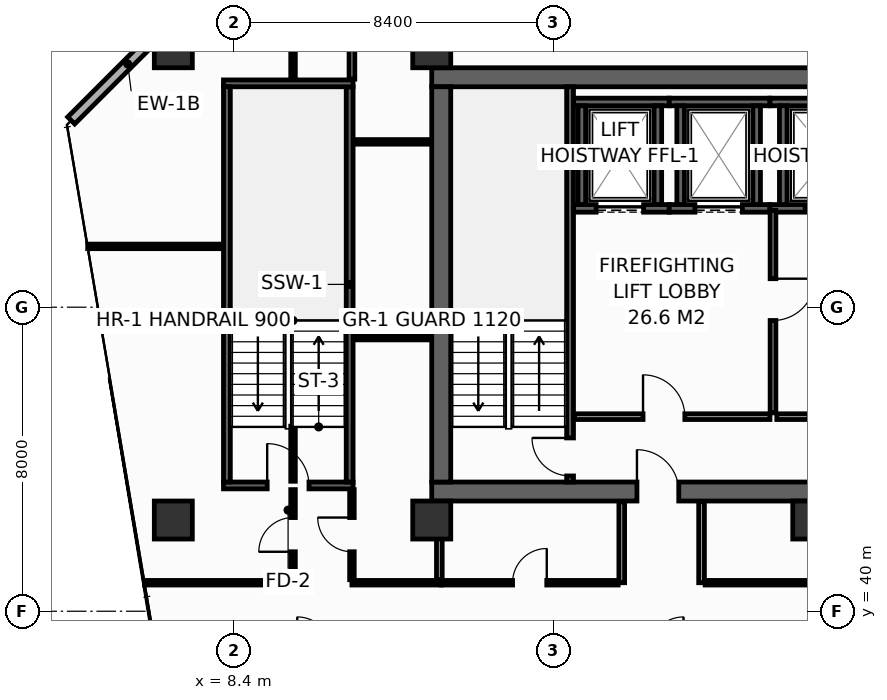
"""IFC4 building model, lengths in metres.
Left out: names, types, materials, properties, quantities, classifications, styles, units other than length and angle.
Written with IfcOpenShell. Run it as: python <this file> out.ifc"""

import sys

from ifc_helpers import new_model, si_unit, direction, frame, frame_2d, origin, origin_2d, place, context, subcontext, project, spatial, rectangle, hollow_rectangle, extrude, element, fill, save


model = new_model("IFC4")
c1 = context("Model", 3, precision=1e-05, world=origin(), true_north=direction((0.0, 1.0)))
c2 = subcontext(c1, "Body", "Model", "MODEL_VIEW")
j1 = project(units=[si_unit("LENGTHUNIT", "METRE"), si_unit("PLANEANGLEUNIT", "RADIAN")], contexts=[c1])
p1 = place(None, origin())
s1 = spatial("IfcSite", under=j1, at=p1, CompositionType="ELEMENT")
p2 = place(p1, origin())
s2 = spatial("IfcBuilding", under=s1, at=p2, CompositionType="ELEMENT")
p3 = place(p2, frame((0.0, 0.0, 167.6)))
s3 = spatial("IfcBuildingStorey", under=s2, at=p3, CompositionType="ELEMENT", Elevation=167.6)
p4 = place(p3, frame((13.6, 43.15, 0.0), z_axis=(0.0, 0.0, 1.0), x_axis=(1.0, 0.0, 0.0)))
e1 = element("IfcWall", 1, at=p4, inside=s3, PredefinedType="SHEAR", context=c2, shape_type="SweptSolid", body=[
    extrude(rectangle(XDim=32.7, YDim=0.5, at=frame_2d((16.35, 0.0))), origin(), (0.0, 0.0, 1.0), 3.55),
])
p5 = place(p4, frame((5.4, 0.0, 0.0)))
e2 = element("IfcOpeningElement", 2, at=p5, cuts=e1, PredefinedType="OPENING", context=c2, shape_type="SweptSolid", body=[
    extrude(rectangle(XDim=1.1, YDim=2.15, at=frame_2d((0.55, 1.075))), frame((0.0, 0.26, 0.0), z_axis=(0.0, -1.0, 0.0), x_axis=(1.0, 0.0, 0.0)), (0.0, 0.0, 1.0), 0.52),
])
p6 = place(p4, frame((25.6, 0.0, 0.0)))
e3 = element("IfcOpeningElement", 3, at=p6, cuts=e1, PredefinedType="OPENING", context=c2, shape_type="SweptSolid", body=[
    extrude(rectangle(XDim=1.1, YDim=2.15, at=frame_2d((0.55, 1.075))), frame((0.0, 0.26, 0.0), z_axis=(0.0, -1.0, 0.0), x_axis=(1.0, 0.0, 0.0)), (0.0, 0.0, 1.0), 0.52),
])
p7 = place(p3, frame((13.6, 54.05, 0.0), z_axis=(0.0, 0.0, 1.0), x_axis=(1.0, 0.0, 0.0)))
e4 = element("IfcWall", 4, at=p7, inside=s3, PredefinedType="SHEAR", context=c2, shape_type="SweptSolid", body=[
    extrude(rectangle(XDim=32.7, YDim=0.5, at=frame_2d((16.35, 0.0))), origin(), (0.0, 0.0, 1.0), 3.55),
])
p8 = place(p3, frame((13.85, 43.4, 0.0), z_axis=(0.0, 0.0, 1.0), x_axis=(0.0, 1.0, 0.0)))
e5 = element("IfcWall", 5, at=p8, inside=s3, PredefinedType="SHEAR", context=c2, shape_type="SweptSolid", body=[
    extrude(rectangle(XDim=10.4, YDim=0.5, at=frame_2d((5.2, 0.0))), origin(), (0.0, 0.0, 1.0), 3.55),
])
for number, where, z_axis, x_axis in (
    (6, (6.8, 54.8, 0.0), (0.0, 0.0, 1.0), (1.0, 0.0, 0.0)),
    (7, (13.6, 54.8, 0.0), (0.0, 0.0, 1.0), (1.0, 0.0, 0.0)),
    (8, (6.8, 42.4, 0.0), (0.0, 0.0, 1.0), (1.0, 0.0, 0.0)),
    (9, (13.6, 42.4, 0.0), (0.0, 0.0, 1.0), (1.0, 0.0, 0.0)),
    (10, (23.6, 42.4, 0.0), (0.0, 0.0, 1.0), (1.0, 0.0, 0.0)),
):
    element("IfcColumn", number, at=place(p3, frame(where, z_axis=z_axis, x_axis=x_axis)), inside=s3, PredefinedType="COLUMN", context=c2, shape_type="SweptSolid", body=[
        extrude(hollow_rectangle(XDim=1.0, YDim=1.0, WallThickness=0.045, at=origin_2d()), origin(), (0.0, 0.0, 1.0), 3.8),
    ])
p9 = place(p3, frame((17.33, 50.6, 0.0), z_axis=(0.0, 0.0, 1.0), x_axis=(1.0, 0.0, 0.0)))
e11 = element("IfcWall", 11, at=p9, inside=s3, PredefinedType="SHEAR", context=c2, shape_type="SweptSolid", body=[
    extrude(rectangle(XDim=2.52, YDim=0.2, at=frame_2d((1.26, 0.0))), origin(), (0.0, 0.0, 1.0), 3.55),
])
p10 = place(p9, frame((0.595, 0.0, 0.0)))
e12 = element("IfcOpeningElement", 12, at=p10, cuts=e11, PredefinedType="OPENING", context=c2, shape_type="SweptSolid", body=[
    extrude(rectangle(XDim=1.25, YDim=2.3, at=frame_2d((0.625, 1.15))), frame((0.0, 0.11, 0.0), z_axis=(0.0, -1.0, 0.0), x_axis=(1.0, 0.0, 0.0)), (0.0, 0.0, 1.0), 0.22),
])
p11 = place(p3, frame((17.33, 53.4, 0.0), z_axis=(0.0, 0.0, 1.0), x_axis=(1.0, 0.0, 0.0)))
e13 = element("IfcWall", 13, at=p11, inside=s3, PredefinedType="SHEAR", context=c2, shape_type="SweptSolid", body=[
    extrude(rectangle(XDim=2.52, YDim=0.2, at=frame_2d((1.26, 0.0))), origin(), (0.0, 0.0, 1.0), 3.55),
])
for number, where, z_axis, x_axis in (
    (14, (17.55, 50.7, 0.0), (0.0, 0.0, 1.0), (0.0, 1.0, 0.0)),
    (15, (19.55, 50.7, 0.0), (0.0, 0.0, 1.0), (0.0, 1.0, 0.0)),
):
    element("IfcWall", number, at=place(p3, frame(where, z_axis=z_axis, x_axis=x_axis)), inside=s3, PredefinedType="SHEAR", context=c2, shape_type="SweptSolid", body=[
        extrude(rectangle(XDim=2.6, YDim=0.2, at=frame_2d((1.3, 0.0))), origin(), (0.0, 0.0, 1.0), 3.55),
    ])
p12 = place(p3, frame((19.85, 50.6, 0.0), z_axis=(0.0, 0.0, 1.0), x_axis=(1.0, 0.0, 0.0)))
e16 = element("IfcWall", 16, at=p12, inside=s3, PredefinedType="SHEAR", context=c2, shape_type="SweptSolid", body=[
    extrude(rectangle(XDim=2.65, YDim=0.2, at=frame_2d((1.325, 0.0))), origin(), (0.0, 0.0, 1.0), 3.55),
])
p13 = place(p12, frame((0.675, 0.0, 0.0)))
e17 = element("IfcOpeningElement", 17, at=p13, cuts=e16, PredefinedType="OPENING", context=c2, shape_type="SweptSolid", body=[
    extrude(rectangle(XDim=1.25, YDim=2.3, at=frame_2d((0.625, 1.15))), frame((0.0, 0.11, 0.0), z_axis=(0.0, -1.0, 0.0), x_axis=(1.0, 0.0, 0.0)), (0.0, 0.0, 1.0), 0.22),
])
p14 = place(p3, frame((19.85, 53.4, 0.0), z_axis=(0.0, 0.0, 1.0), x_axis=(1.0, 0.0, 0.0)))
e18 = element("IfcWall", 18, at=p14, inside=s3, PredefinedType="SHEAR", context=c2, shape_type="SweptSolid", body=[
    extrude(rectangle(XDim=2.65, YDim=0.2, at=frame_2d((1.325, 0.0))), origin(), (0.0, 0.0, 1.0), 3.55),
])
for number, where, z_axis, x_axis in (
    (19, (20.15, 50.7, 0.0), (0.0, 0.0, 1.0), (0.0, 1.0, 0.0)),
    (20, (22.15, 50.7, 0.0), (0.0, 0.0, 1.0), (0.0, 1.0, 0.0)),
):
    element("IfcWall", number, at=place(p3, frame(where, z_axis=z_axis, x_axis=x_axis)), inside=s3, PredefinedType="SHEAR", context=c2, shape_type="SweptSolid", body=[
        extrude(rectangle(XDim=2.6, YDim=0.2, at=frame_2d((1.3, 0.0))), origin(), (0.0, 0.0, 1.0), 3.55),
    ])
p15 = place(p3, frame((22.5, 50.6, 0.0), z_axis=(0.0, 0.0, 1.0), x_axis=(1.0, 0.0, 0.0)))
e21 = element("IfcWall", 21, at=p15, inside=s3, PredefinedType="SHEAR", context=c2, shape_type="SweptSolid", body=[
    extrude(rectangle(XDim=2.85, YDim=0.2, at=frame_2d((1.425, 0.0))), origin(), (0.0, 0.0, 1.0), 3.55),
])
p16 = place(p15, frame((0.925, 0.0, 0.0)))
e22 = element("IfcOpeningElement", 22, at=p16, cuts=e21, PredefinedType="OPENING", context=c2, shape_type="SweptSolid", body=[
    extrude(rectangle(XDim=1.25, YDim=2.3, at=frame_2d((0.625, 1.15))), frame((0.0, 0.11, 0.0), z_axis=(0.0, -1.0, 0.0), x_axis=(1.0, 0.0, 0.0)), (0.0, 0.0, 1.0), 0.22),
])
p17 = place(p3, frame((22.5, 53.4, 0.0), z_axis=(0.0, 0.0, 1.0), x_axis=(1.0, 0.0, 0.0)))
e23 = element("IfcWall", 23, at=p17, inside=s3, PredefinedType="SHEAR", context=c2, shape_type="SweptSolid", body=[
    extrude(rectangle(XDim=2.85, YDim=0.2, at=frame_2d((1.425, 0.0))), origin(), (0.0, 0.0, 1.0), 3.55),
])
p18 = place(p3, frame((22.85, 50.7, 0.0), z_axis=(0.0, 0.0, 1.0), x_axis=(0.0, 1.0, 0.0)))
e24 = element("IfcWall", 24, at=p18, inside=s3, PredefinedType="SHEAR", context=c2, shape_type="SweptSolid", body=[
    extrude(rectangle(XDim=2.6, YDim=0.2, at=frame_2d((1.3, 0.0))), origin(), (0.0, 0.0, 1.0), 3.55),
])
p19 = place(p3, frame((17.24, 43.4, 0.0), z_axis=(0.0, 0.0, 1.0), x_axis=(0.0, 1.0, 0.0)))
e25 = element("IfcWall", 25, at=p19, inside=s3, PredefinedType="SHEAR", context=c2, shape_type="SweptSolid", body=[
    extrude(rectangle(XDim=10.4, YDim=0.18, at=frame_2d((5.2, 0.0))), origin(), (0.0, 0.0, 1.0), 3.55),
])
p20 = place(p19, frame((0.16, 0.0, 0.0)))
e26 = element("IfcOpeningElement", 26, at=p20, cuts=e25, PredefinedType="OPENING", context=c2, shape_type="SweptSolid", body=[
    extrude(rectangle(XDim=1.0, YDim=2.15, at=frame_2d((0.5, 1.075))), frame((0.0, 0.1, 0.0), z_axis=(0.0, -1.0, 0.0), x_axis=(1.0, 0.0, 0.0)), (0.0, 0.0, 1.0), 0.2),
])
p21 = place(p3, frame((8.12, 43.31, 0.0), z_axis=(0.0, 0.0, 1.0), x_axis=(1.0, 0.0, 0.0)))
e27 = element("IfcWall", 27, at=p21, inside=s3, PredefinedType="SHEAR", context=c2, shape_type="SweptSolid", body=[
    extrude(rectangle(XDim=3.41, YDim=0.18, at=frame_2d((1.705, 0.0))), origin(), (0.0, 0.0, 1.0), 3.55),
])
p22 = place(p21, frame((1.15, 0.0, 0.0)))
e28 = element("IfcOpeningElement", 28, at=p22, cuts=e27, PredefinedType="OPENING", context=c2, shape_type="SweptSolid", body=[
    extrude(rectangle(XDim=1.1, YDim=2.15, at=frame_2d((0.55, 1.075))), frame((0.0, 0.1, 0.0), z_axis=(0.0, -1.0, 0.0), x_axis=(1.0, 0.0, 0.0)), (0.0, 0.0, 1.0), 0.2),
])
p23 = place(p3, frame((11.44, 43.4, 0.0), z_axis=(0.0, 0.0, 1.0), x_axis=(0.0, 1.0, 0.0)))
e29 = element("IfcWall", 29, at=p23, inside=s3, PredefinedType="SHEAR", context=c2, shape_type="SweptSolid", body=[
    extrude(rectangle(XDim=10.4, YDim=0.18, at=frame_2d((5.2, 0.0))), origin(), (0.0, 0.0, 1.0), 3.55),
])
p24 = place(p3, frame((11.53, 53.89, 0.0), z_axis=(0.0, 0.0, 1.0), x_axis=(-1.0, 0.0, 0.0)))
e30 = element("IfcWall", 30, at=p24, inside=s3, PredefinedType="SHEAR", context=c2, shape_type="SweptSolid", body=[
    extrude(rectangle(XDim=3.41, YDim=0.18, at=frame_2d((1.705, 0.0))), origin(), (0.0, 0.0, 1.0), 3.55),
])
p25 = place(p3, frame((8.21, 53.8, 0.0), z_axis=(0.0, 0.0, 1.0), x_axis=(0.0, -1.0, 0.0)))
e31 = element("IfcWall", 31, at=p25, inside=s3, PredefinedType="SHEAR", context=c2, shape_type="SweptSolid", body=[
    extrude(rectangle(XDim=10.4, YDim=0.18, at=frame_2d((5.2, 0.0))), origin(), (0.0, 0.0, 1.0), 3.55),
])
p26 = place(p3, frame((17.36, 45.12, 0.0), z_axis=(0.0, 0.0, 1.0), x_axis=(1.0, 0.0, 0.0)))
e32 = element("IfcWall", 32, at=p26, inside=s3, PredefinedType="PARTITIONING", context=c2, shape_type="SweptSolid", body=[
    extrude(rectangle(XDim=5.14, YDim=0.15, at=frame_2d((2.57, 0.0))), origin(), (0.0, 0.0, 1.0), 3.55),
])
p27 = place(p26, frame((1.8, 0.0, 0.0)))
e33 = element("IfcOpeningElement", 33, at=p27, cuts=e32, PredefinedType="OPENING", context=c2, shape_type="SweptSolid", body=[
    extrude(rectangle(XDim=1.1, YDim=2.15, at=frame_2d((0.55, 1.075))), frame((0.0, 0.085, 0.0), z_axis=(0.0, -1.0, 0.0), x_axis=(1.0, 0.0, 0.0)), (0.0, 0.0, 1.0), 0.17),
])
p28 = place(p3, frame((22.58, 50.55, 0.0), z_axis=(0.0, 0.0, 1.0), x_axis=(0.0, -1.0, 0.0)))
e34 = element("IfcWall", 34, at=p28, inside=s3, PredefinedType="PARTITIONING", context=c2, shape_type="SweptSolid", body=[
    extrude(rectangle(XDim=5.33, YDim=0.15, at=frame_2d((2.665, 0.0))), origin(), (0.0, 0.0, 1.0), 3.55),
])
p29 = place(p28, frame((1.8, 0.0, 0.0)))
e35 = element("IfcOpeningElement", 35, at=p29, cuts=e34, PredefinedType="OPENING", context=c2, shape_type="SweptSolid", body=[
    extrude(rectangle(XDim=1.1, YDim=2.15, at=frame_2d((0.55, 1.075))), frame((0.0, 0.085, 0.0), z_axis=(0.0, -1.0, 0.0), x_axis=(1.0, 0.0, 0.0)), (0.0, 0.0, 1.0), 0.17),
])
p30 = place(p3, frame((22.68, 45.12, 0.0), z_axis=(0.0, 0.0, 1.0), x_axis=(1.0, 0.0, 0.0)))
e36 = element("IfcWall", 36, at=p30, inside=s3, PredefinedType="PARTITIONING", context=c2, shape_type="SweptSolid", body=[
    extrude(rectangle(XDim=2.92, YDim=0.15, at=frame_2d((1.46, 0.0))), origin(), (0.0, 0.0, 1.0), 3.55),
])
p31 = place(p30, frame((0.85, 0.0, 0.0)))
e37 = element("IfcOpeningElement", 37, at=p31, cuts=e36, PredefinedType="OPENING", context=c2, shape_type="SweptSolid", body=[
    extrude(rectangle(XDim=1.1, YDim=2.15, at=frame_2d((0.55, 1.075))), frame((0.0, 0.085, 0.0), z_axis=(0.0, -1.0, 0.0), x_axis=(1.0, 0.0, 0.0)), (0.0, 0.0, 1.0), 0.17),
])
p32 = place(p3, frame((7.087, 55.887, 0.0), z_axis=(0.0, 0.0, 1.0), x_axis=(-0.707106781187, -0.707106781187, 0.0)))
e38 = element("IfcWall", 38, at=p32, inside=s3, PredefinedType="STANDARD", context=c2, shape_type="SweptSolid", body=[
    extrude(rectangle(XDim=4.206, YDim=0.26, at=frame_2d((2.103, 0.0))), origin(), (0.0, 0.0, 1.0), 3.55),
])
p33 = place(p3, frame((6.045, 40.75, 0.0), z_axis=(0.0, 0.0, 1.0), x_axis=(1.0, 0.0, 0.0)))
e39 = element("IfcWall", 39, at=p33, inside=s3, PredefinedType="PARTITIONING", context=c2, shape_type="SweptSolid", body=[
    extrude(rectangle(XDim=3.905, YDim=0.12, at=frame_2d((1.952, 0.0))), origin(), (0.0, 0.0, 1.0), 3.035),
])
p34 = place(p3, frame((11.5, 40.75, 0.0), z_axis=(0.0, 0.0, 1.0), x_axis=(1.0, 0.0, 0.0)))
e40 = element("IfcWall", 40, at=p34, inside=s3, PredefinedType="PARTITIONING", context=c2, shape_type="SweptSolid", body=[
    extrude(rectangle(XDim=2.35, YDim=0.12, at=frame_2d((1.175, 0.0))), origin(), (0.0, 0.0, 1.0), 3.55),
])
p35 = place(p3, frame((11.55, 52.35, 0.0), z_axis=(0.0, 0.0, 1.0), x_axis=(1.0, 0.0, 0.0)))
e41 = element("IfcWall", 41, at=p35, inside=s3, PredefinedType="PARTITIONING", context=c2, shape_type="SweptSolid", body=[
    extrude(rectangle(XDim=2.03, YDim=0.12, at=frame_2d((1.015, 0.0))), origin(), (0.0, 0.0, 1.0), 3.55),
])
p36 = place(p3, frame((11.5, 54.0, 0.0), z_axis=(0.0, 0.0, 1.0), x_axis=(0.0, 1.0, 0.0)))
e42 = element("IfcWall", 42, at=p36, inside=s3, PredefinedType="PARTITIONING", context=c2, shape_type="SweptSolid", body=[
    extrude(rectangle(XDim=1.995, YDim=0.15, at=frame_2d((0.998, 0.0))), origin(), (0.0, 0.0, 1.0), 2.935),
])
p37 = place(p3, frame((4.547, 49.6, 0.0), z_axis=(0.0, 0.0, 1.0), x_axis=(1.0, 0.0, 0.0)))
e43 = element("IfcWall", 43, at=p37, inside=s3, PredefinedType="PARTITIONING", context=c2, shape_type="SweptSolid", body=[
    extrude(rectangle(XDim=3.553, YDim=0.12, at=frame_2d((1.777, 0.0))), origin(), (0.0, 0.0, 1.0), 2.835),
])
p38 = place(p3, frame((9.95, 40.83, 0.0), z_axis=(0.0, 0.0, 1.0), x_axis=(0.0, 1.0, 0.0)))
e44 = element("IfcWall", 44, at=p38, inside=s3, PredefinedType="PARTITIONING", context=c2, shape_type="SweptSolid", body=[
    extrude(rectangle(XDim=2.37, YDim=0.12, at=frame_2d((1.185, 0.0))), origin(), (0.0, 0.0, 1.0), 2.835),
])
p39 = place(p38, frame((0.735, 0.0, 0.0)))
e45 = element("IfcOpeningElement", 45, at=p39, cuts=e44, PredefinedType="OPENING", context=c2, shape_type="SweptSolid", body=[
    extrude(rectangle(XDim=0.9, YDim=2.1, at=frame_2d((0.45, 1.05))), frame((0.0, 0.07, 0.0), z_axis=(0.0, -1.0, 0.0), x_axis=(1.0, 0.0, 0.0)), (0.0, 0.0, 1.0), 0.14),
])
p40 = place(p3, frame((9.95, 43.42, 0.0), z_axis=(0.0, 0.0, 1.0), x_axis=(0.0, 1.0, 0.0)))
e46 = element("IfcWall", 46, at=p40, inside=s3, PredefinedType="PARTITIONING", context=c2, shape_type="SweptSolid", body=[
    extrude(rectangle(XDim=1.45, YDim=0.12, at=frame_2d((0.725, 0.0))), origin(), (0.0, 0.0, 1.0), 3.55),
])
p41 = place(p3, frame((9.95, 54.0, 0.0), z_axis=(0.0, 0.0, 1.0), x_axis=(0.0, 1.0, 0.0)))
e47 = element("IfcWall", 47, at=p41, inside=s3, PredefinedType="PARTITIONING", context=c2, shape_type="SweptSolid", body=[
    extrude(rectangle(XDim=1.995, YDim=0.12, at=frame_2d((0.998, 0.0))), origin(), (0.0, 0.0, 1.0), 2.935),
])
p42 = place(p3, frame((11.55, 47.2, 0.0), z_axis=(0.0, 0.0, 1.0), x_axis=(1.0, 0.0, 0.0)))
e48 = element("IfcWall", 48, at=p42, inside=s3, PredefinedType="PARTITIONING", context=c2, shape_type="SweptSolid", body=[
    extrude(rectangle(XDim=2.03, YDim=0.12, at=frame_2d((1.015, 0.0))), origin(), (0.0, 0.0, 1.0), 3.55),
])
p43 = place(p3, frame((11.5, 40.83, 0.0), z_axis=(0.0, 0.0, 1.0), x_axis=(0.0, 1.0, 0.0)))
e49 = element("IfcWall", 49, at=p43, inside=s3, PredefinedType="PARTITIONING", context=c2, shape_type="SweptSolid", body=[
    extrude(rectangle(XDim=2.37, YDim=0.12, at=frame_2d((1.185, 0.0))), origin(), (0.0, 0.0, 1.0), 2.835),
])
p44 = place(p43, frame((0.735, 0.0, 0.0)))
e50 = element("IfcOpeningElement", 50, at=p44, cuts=e49, PredefinedType="OPENING", context=c2, shape_type="SweptSolid", body=[
    extrude(rectangle(XDim=0.9, YDim=2.1, at=frame_2d((0.45, 1.05))), frame((0.0, 0.07, 0.0), z_axis=(0.0, -1.0, 0.0), x_axis=(1.0, 0.0, 0.0)), (0.0, 0.0, 1.0), 0.14),
])
p45 = place(p3, frame((13.8, 40.83, 0.0), z_axis=(0.0, 0.0, 1.0), x_axis=(0.0, 1.0, 0.0)))
e51 = element("IfcWall", 51, at=p45, inside=s3, PredefinedType="PARTITIONING", context=c2, shape_type="SweptSolid", body=[
    extrude(rectangle(XDim=2.05, YDim=0.15, at=frame_2d((1.025, 0.0))), origin(), (0.0, 0.0, 1.0), 3.55),
])
for number, where, z_axis, x_axis in (
    (52, (18.6, 40.75, 0.0), (0.0, 0.0, 1.0), (0.0, 1.0, 0.0)),
    (53, (20.7, 40.75, 0.0), (0.0, 0.0, 1.0), (0.0, 1.0, 0.0)),
):
    element("IfcWall", number, at=place(p3, frame(where, z_axis=z_axis, x_axis=x_axis)), inside=s3, PredefinedType="PARTITIONING", context=c2, shape_type="SweptSolid", body=[
        extrude(rectangle(XDim=2.13, YDim=0.15, at=frame_2d((1.065, 0.0))), origin(), (0.0, 0.0, 1.0), 3.55),
    ])
p46 = place(p3, frame((13.85, 40.75, 0.0), z_axis=(0.0, 0.0, 1.0), x_axis=(1.0, 0.0, 0.0)))
e54 = element("IfcWall", 54, at=p46, inside=s3, PredefinedType="PARTITIONING", context=c2, shape_type="SweptSolid", body=[
    extrude(rectangle(XDim=4.655, YDim=0.12, at=frame_2d((2.327, 0.0))), origin(), (0.0, 0.0, 1.0), 3.55),
])
p47 = place(p46, frame((1.877, 0.0, 0.0)))
e55 = element("IfcOpeningElement", 55, at=p47, cuts=e54, PredefinedType="OPENING", context=c2, shape_type="SweptSolid", body=[
    extrude(rectangle(XDim=0.9, YDim=2.1, at=frame_2d((0.45, 1.05))), frame((0.0, 0.07, 0.0), z_axis=(0.0, -1.0, 0.0), x_axis=(1.0, 0.0, 0.0)), (0.0, 0.0, 1.0), 0.14),
])
p48 = place(p3, frame((20.795, 40.75, 0.0), z_axis=(0.0, 0.0, 1.0), x_axis=(1.0, 0.0, 0.0)))
e56 = element("IfcWall", 56, at=p48, inside=s3, PredefinedType="PARTITIONING", context=c2, shape_type="SweptSolid", body=[
    extrude(rectangle(XDim=17.91, YDim=0.12, at=frame_2d((8.955, 0.0))), origin(), (0.0, 0.0, 1.0), 2.835),
])
p49 = place(p48, frame((8.505, 0.0, 0.0)))
e57 = element("IfcOpeningElement", 57, at=p49, cuts=e56, PredefinedType="OPENING", context=c2, shape_type="SweptSolid", body=[
    extrude(rectangle(XDim=0.9, YDim=2.1, at=frame_2d((0.45, 1.05))), frame((0.0, 0.07, 0.0), z_axis=(0.0, -1.0, 0.0), x_axis=(1.0, 0.0, 0.0)), (0.0, 0.0, 1.0), 0.14),
])
p50 = place(p10, origin())
e58 = element("IfcDoor", 58, at=p50, inside=s3, OperationType="SLIDING_TO_LEFT", PredefinedType="DOOR", context=c2, shape_type="SweptSolid", body=[
    extrude(rectangle(XDim=1.25, YDim=2.3, at=frame_2d((0.625, 1.15))), frame((0.0, 0.025, 0.0), z_axis=(0.0, -1.0, 0.0), x_axis=(1.0, 0.0, 0.0)), (0.0, 0.0, 1.0), 0.05),
])
fill(e12, e58)
p51 = place(p13, origin())
e59 = element("IfcDoor", 59, at=p51, inside=s3, OperationType="SLIDING_TO_LEFT", PredefinedType="DOOR", context=c2, shape_type="SweptSolid", body=[
    extrude(rectangle(XDim=1.25, YDim=2.3, at=frame_2d((0.625, 1.15))), frame((0.0, 0.025, 0.0), z_axis=(0.0, -1.0, 0.0), x_axis=(1.0, 0.0, 0.0)), (0.0, 0.0, 1.0), 0.05),
])
fill(e17, e59)
p52 = place(p16, origin())
e60 = element("IfcDoor", 60, at=p52, inside=s3, OperationType="SLIDING_TO_LEFT", PredefinedType="DOOR", context=c2, shape_type="SweptSolid", body=[
    extrude(rectangle(XDim=1.25, YDim=2.3, at=frame_2d((0.625, 1.15))), frame((0.0, 0.025, 0.0), z_axis=(0.0, -1.0, 0.0), x_axis=(1.0, 0.0, 0.0)), (0.0, 0.0, 1.0), 0.05),
])
fill(e22, e60)
p53 = place(p20, origin())
e61 = element("IfcDoor", 61, at=p53, inside=s3, OperationType="SINGLE_SWING_RIGHT", PredefinedType="DOOR", context=c2, shape_type="SweptSolid", body=[
    extrude(rectangle(XDim=1.0, YDim=2.15, at=frame_2d((0.5, 1.075))), frame((0.0, 0.025, 0.0), z_axis=(0.0, -1.0, 0.0), x_axis=(1.0, 0.0, 0.0)), (0.0, 0.0, 1.0), 0.05),
])
fill(e26, e61)
p54 = place(p22, origin())
e62 = element("IfcDoor", 62, at=p54, inside=s3, OperationType="SINGLE_SWING_LEFT", PredefinedType="DOOR", context=c2, shape_type="SweptSolid", body=[
    extrude(rectangle(XDim=1.1, YDim=2.15, at=frame_2d((0.55, 1.075))), frame((0.0, 0.025, 0.0), z_axis=(0.0, -1.0, 0.0), x_axis=(1.0, 0.0, 0.0)), (0.0, 0.0, 1.0), 0.05),
])
fill(e28, e62)
p55 = place(p27, origin())
e63 = element("IfcDoor", 63, at=p55, inside=s3, OperationType="SINGLE_SWING_LEFT", PredefinedType="DOOR", context=c2, shape_type="SweptSolid", body=[
    extrude(rectangle(XDim=1.1, YDim=2.15, at=frame_2d((0.55, 1.075))), frame((0.0, 0.025, 0.0), z_axis=(0.0, -1.0, 0.0), x_axis=(1.0, 0.0, 0.0)), (0.0, 0.0, 1.0), 0.05),
])
fill(e33, e63)
p56 = place(p29, origin())
e64 = element("IfcDoor", 64, at=p56, inside=s3, OperationType="SINGLE_SWING_LEFT", PredefinedType="DOOR", context=c2, shape_type="SweptSolid", body=[
    extrude(rectangle(XDim=1.1, YDim=2.15, at=frame_2d((0.55, 1.075))), frame((0.0, 0.025, 0.0), z_axis=(0.0, -1.0, 0.0), x_axis=(1.0, 0.0, 0.0)), (0.0, 0.0, 1.0), 0.05),
])
fill(e35, e64)
p57 = place(p5, origin())
e65 = element("IfcDoor", 65, at=p57, inside=s3, OperationType="SINGLE_SWING_LEFT", PredefinedType="DOOR", context=c2, shape_type="SweptSolid", body=[
    extrude(rectangle(XDim=1.1, YDim=2.15, at=frame_2d((0.55, 1.075))), frame((0.0, 0.025, 0.0), z_axis=(0.0, -1.0, 0.0), x_axis=(1.0, 0.0, 0.0)), (0.0, 0.0, 1.0), 0.05),
])
fill(e2, e65)
p58 = place(p39, origin())
e66 = element("IfcDoor", 66, at=p58, inside=s3, OperationType="SINGLE_SWING_LEFT", PredefinedType="DOOR", context=c2, shape_type="SweptSolid", body=[
    extrude(rectangle(XDim=0.9, YDim=2.1, at=frame_2d((0.45, 1.05))), frame((0.0, 0.025, 0.0), z_axis=(0.0, -1.0, 0.0), x_axis=(1.0, 0.0, 0.0)), (0.0, 0.0, 1.0), 0.05),
])
fill(e45, e66)
p59 = place(p44, origin())
e67 = element("IfcDoor", 67, at=p59, inside=s3, OperationType="SINGLE_SWING_RIGHT", PredefinedType="DOOR", context=c2, shape_type="SweptSolid", body=[
    extrude(rectangle(XDim=0.9, YDim=2.1, at=frame_2d((0.45, 1.05))), frame((0.0, 0.025, 0.0), z_axis=(0.0, -1.0, 0.0), x_axis=(1.0, 0.0, 0.0)), (0.0, 0.0, 1.0), 0.05),
])
fill(e50, e67)
p60 = place(p47, origin())
e68 = element("IfcDoor", 68, at=p60, inside=s3, OperationType="SINGLE_SWING_RIGHT", PredefinedType="DOOR", context=c2, shape_type="SweptSolid", body=[
    extrude(rectangle(XDim=0.9, YDim=2.1, at=frame_2d((0.45, 1.05))), frame((0.0, 0.025, 0.0), z_axis=(0.0, -1.0, 0.0), x_axis=(1.0, 0.0, 0.0)), (0.0, 0.0, 1.0), 0.05),
])
fill(e55, e68)
save(model, sys.argv[1])
